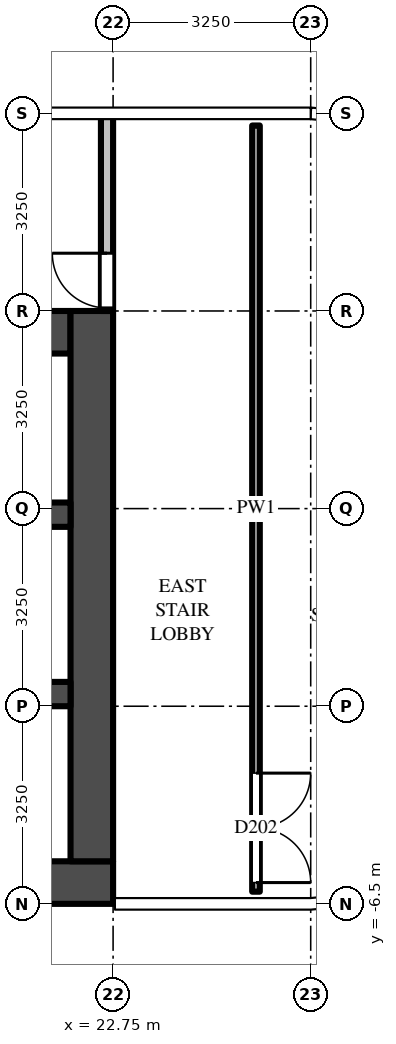
"""IFC4 building model, lengths in metres.
Left out: names, types, materials, properties, quantities, classifications, styles, units other than length and angle.
Written with IfcOpenShell. Run it as: python <this file> out.ifc"""

import sys

from ifc_helpers import new_model, si_unit, direction, frame, frame_2d, origin, place, context, subcontext, project, spatial, rectangle, extrude, source, transform, mapped, element, fill, save


model = new_model("IFC4")
c1 = context("Model", 3, precision=1e-05, world=origin(), true_north=direction((0.0, 1.0)))
c2 = subcontext(c1, "Body", "Model", "MODEL_VIEW")
j1 = project(units=[si_unit("LENGTHUNIT", "METRE"), si_unit("PLANEANGLEUNIT", "RADIAN")], contexts=[c1])
p1 = place(None, origin())
s1 = spatial("IfcSite", under=j1, at=p1, CompositionType="ELEMENT")
p2 = place(p1, origin())
s2 = spatial("IfcBuilding", under=s1, at=p2, CompositionType="ELEMENT")
p3 = place(p2, frame((0.0, 0.0, 124.5)))
s3 = spatial("IfcBuildingStorey", under=s2, at=p3, CompositionType="ELEMENT", Elevation=124.5)
m1 = source(origin(), c2, "Body", "SweptSolid", [
    extrude(rectangle(XDim=16.5, YDim=0.7, at=frame_2d((8.25, 0.0))), origin(), (0.0, 0.0, 1.0), 4.25),
])
p4 = place(p3, frame((6.25, -6.15, 0.0), z_axis=(0.0, 0.0, 1.0), x_axis=(1.0, 0.0, 0.0)))
e1 = element("IfcWall", 1, at=p4, inside=s3, PredefinedType="SHEAR", context=c2, shape_type="MappedRepresentation", body=[
    mapped(m1, transform((0.0, 0.0, 0.0))),
])
m2 = source(origin(), c2, "Body", "SweptSolid", [
    extrude(rectangle(XDim=14.85, YDim=0.7, at=frame_2d((7.425, 0.0))), origin(), (0.0, 0.0, 1.0), 4.25),
])
p5 = place(p3, frame((7.2, 2.9, 0.0), z_axis=(0.0, 0.0, 1.0), x_axis=(1.0, 0.0, 0.0)))
e2 = element("IfcWall", 2, at=p5, inside=s3, PredefinedType="SHEAR", context=c2, shape_type="MappedRepresentation", body=[
    mapped(m2, transform((0.0, 0.0, 0.0))),
])
m3 = source(origin(), c2, "Body", "SweptSolid", [
    extrude(rectangle(XDim=1.3, YDim=2.1, at=frame_2d((0.65, 1.05))), frame((0.0, 0.36, 0.0), z_axis=(0.0, -1.0, 0.0), x_axis=(1.0, 0.0, 0.0)), (0.0, 0.0, 1.0), 0.72),
])
p6 = place(p5, frame((12.2, 0.0, 0.0)))
e3 = element("IfcOpeningElement", 3, at=p6, cuts=e2, PredefinedType="OPENING", context=c2, shape_type="MappedRepresentation", body=[
    mapped(m3, transform((0.0, 0.0, 0.0))),
])
m4 = source(origin(), c2, "Body", "SweptSolid", [
    extrude(rectangle(XDim=1.2, YDim=2.1, at=frame_2d((0.6, 1.05))), frame((0.0, 0.36, 0.0), z_axis=(0.0, -1.0, 0.0), x_axis=(1.0, 0.0, 0.0)), (0.0, 0.0, 1.0), 0.72),
])
p7 = place(p5, frame((9.85, 0.0, 0.0)))
e4 = element("IfcOpeningElement", 4, at=p7, cuts=e2, PredefinedType="OPENING", context=c2, shape_type="MappedRepresentation", body=[
    mapped(m4, transform((0.0, 0.0, 0.0))),
])
m5 = source(origin(), c2, "Body", "SweptSolid", [
    extrude(rectangle(XDim=1.0, YDim=2.1, at=frame_2d((0.5, 1.05))), frame((0.0, 0.36, 0.0), z_axis=(0.0, -1.0, 0.0), x_axis=(1.0, 0.0, 0.0)), (0.0, 0.0, 1.0), 0.72),
])
p8 = place(p5, frame((7.9, 0.0, 0.0)))
e5 = element("IfcOpeningElement", 5, at=p8, cuts=e2, PredefinedType="OPENING", context=c2, shape_type="MappedRepresentation", body=[
    mapped(m5, transform((0.0, 0.0, 0.0))),
])
m6 = source(origin(), c2, "Body", "SweptSolid", [
    extrude(rectangle(XDim=0.9, YDim=2.1, at=frame_2d((0.45, 1.05))), frame((0.0, 0.36, 0.0), z_axis=(0.0, -1.0, 0.0), x_axis=(1.0, 0.0, 0.0)), (0.0, 0.0, 1.0), 0.72),
])
p9 = place(p5, frame((0.65, 0.0, 0.0)))
e6 = element("IfcOpeningElement", 6, at=p9, cuts=e2, PredefinedType="OPENING", context=c2, shape_type="MappedRepresentation", body=[
    mapped(m6, transform((0.0, 0.0, 0.0))),
])
p10 = place(p5, frame((3.2, 0.0, 0.0)))
e7 = element("IfcOpeningElement", 7, at=p10, cuts=e2, PredefinedType="OPENING", context=c2, shape_type="MappedRepresentation", body=[
    mapped(m5, transform((0.0, 0.0, 0.0))),
])
p11 = place(p5, frame((5.85, 0.0, 0.0)))
e8 = element("IfcOpeningElement", 8, at=p11, cuts=e2, PredefinedType="OPENING", context=c2, shape_type="MappedRepresentation", body=[
    mapped(m6, transform((0.0, 0.0, 0.0))),
])
m7 = source(origin(), c2, "Body", "SweptSolid", [
    extrude(rectangle(XDim=9.05, YDim=0.7, at=frame_2d((4.525, 0.0))), origin(), (0.0, 0.0, 1.0), 4.25),
])
p12 = place(p3, frame((22.4, -5.8, 0.0), z_axis=(0.0, 0.0, 1.0), x_axis=(0.0, 1.0, 0.0)))
e9 = element("IfcWall", 9, at=p12, inside=s3, PredefinedType="SHEAR", context=c2, shape_type="MappedRepresentation", body=[
    mapped(m7, transform((0.0, 0.0, 0.0))),
])
m8 = source(origin(), c2, "Body", "SweptSolid", [
    extrude(rectangle(XDim=14.85, YDim=0.4, at=frame_2d((7.425, 0.0))), origin(), (0.0, 0.0, 1.0), 4.25),
])
p13 = place(p3, frame((7.2, -0.1, 0.0), z_axis=(0.0, 0.0, 1.0), x_axis=(1.0, 0.0, 0.0)))
e10 = element("IfcWall", 10, at=p13, inside=s3, PredefinedType="SHEAR", context=c2, shape_type="MappedRepresentation", body=[
    mapped(m8, transform((0.0, 0.0, 0.0))),
])
m9 = source(origin(), c2, "Body", "SweptSolid", [
    extrude(rectangle(XDim=1.0, YDim=2.1, at=frame_2d((0.5, 1.05))), frame((0.0, 0.21, 0.0), z_axis=(0.0, -1.0, 0.0), x_axis=(1.0, 0.0, 0.0)), (0.0, 0.0, 1.0), 0.42),
])
p14 = place(p13, frame((7.9, 0.0, 0.0)))
e11 = element("IfcOpeningElement", 11, at=p14, cuts=e10, PredefinedType="OPENING", context=c2, shape_type="MappedRepresentation", body=[
    mapped(m9, transform((0.0, 0.0, 0.0))),
])
m10 = source(origin(), c2, "Body", "SweptSolid", [
    extrude(rectangle(XDim=5.7, YDim=0.4, at=frame_2d((2.85, 0.0))), origin(), (0.0, 0.0, 1.0), 4.25),
])
p15 = place(p3, frame((16.35, -3.05, 0.0), z_axis=(0.0, 0.0, 1.0), x_axis=(1.0, 0.0, 0.0)))
e12 = element("IfcWall", 12, at=p15, inside=s3, PredefinedType="SHEAR", context=c2, shape_type="MappedRepresentation", body=[
    mapped(m10, transform((0.0, 0.0, 0.0))),
])
m11 = source(origin(), c2, "Body", "SweptSolid", [
    extrude(rectangle(XDim=3.25, YDim=0.2, at=frame_2d((1.625, 0.0))), origin(), (0.0, 0.0, 1.0), 4.25),
])
p16 = place(p3, frame((22.65, 3.25, 0.0), z_axis=(0.0, 0.0, 1.0), x_axis=(0.0, 1.0, 0.0)))
e13 = element("IfcWall", 13, at=p16, inside=s3, PredefinedType="PARTITIONING", context=c2, shape_type="MappedRepresentation", body=[
    mapped(m11, transform((0.0, 0.0, 0.0))),
])
m12 = source(origin(), c2, "Body", "SweptSolid", [
    extrude(rectangle(XDim=0.9, YDim=2.1, at=frame_2d((0.45, 1.05))), frame((0.0, 0.11, 0.0), z_axis=(0.0, -1.0, 0.0), x_axis=(1.0, 0.0, 0.0)), (0.0, 0.0, 1.0), 0.22),
])
p17 = place(p16, frame((0.05, 0.0, 0.0)))
e14 = element("IfcOpeningElement", 14, at=p17, cuts=e13, PredefinedType="OPENING", context=c2, shape_type="MappedRepresentation", body=[
    mapped(m12, transform((0.0, 0.0, 0.0))),
])
m13 = source(origin(), c2, "Body", "SweptSolid", [
    extrude(rectangle(XDim=12.6, YDim=0.125, at=frame_2d((6.3, 0.0))), origin(), (0.0, 0.0, 1.0), 3.33),
])
p18 = place(p3, frame((25.1, 6.3, 0.0), z_axis=(0.0, 0.0, 1.0), x_axis=(0.0, -1.0, 0.0)))
e15 = element("IfcWall", 15, at=p18, inside=s3, PredefinedType="PARTITIONING", context=c2, shape_type="MappedRepresentation", body=[
    mapped(m13, transform((0.0, 0.0, 0.0))),
])
m14 = source(origin(), c2, "Body", "SweptSolid", [
    extrude(rectangle(XDim=1.8, YDim=2.1, at=frame_2d((0.9, 1.05))), frame((0.0, 0.073, 0.0), z_axis=(0.0, -1.0, 0.0), x_axis=(1.0, 0.0, 0.0)), (0.0, 0.0, 1.0), 0.145),
])
p19 = place(p18, frame((10.65, 0.0, 0.0)))
e16 = element("IfcOpeningElement", 16, at=p19, cuts=e15, PredefinedType="OPENING", context=c2, shape_type="MappedRepresentation", body=[
    mapped(m14, transform((0.0, 0.0, 0.0))),
])
m15 = source(origin(), c2, "Body", "SweptSolid", [
    extrude(rectangle(XDim=0.9, YDim=2.1, at=frame_2d((0.45, 1.05))), frame((0.0, 0.025, 0.0), z_axis=(0.0, -1.0, 0.0), x_axis=(1.0, 0.0, 0.0)), (0.0, 0.0, 1.0), 0.05),
])
p20 = place(p17, origin())
e17 = element("IfcDoor", 17, at=p20, inside=s3, OperationType="SINGLE_SWING_RIGHT", PredefinedType="DOOR", context=c2, shape_type="MappedRepresentation", body=[
    mapped(m15, transform((0.0, 0.0, 0.0))),
])
fill(e14, e17)
m16 = source(origin(), c2, "Body", "SweptSolid", [
    extrude(rectangle(XDim=1.8, YDim=2.1, at=frame_2d((0.9, 1.05))), frame((0.0, 0.025, 0.0), z_axis=(0.0, -1.0, 0.0), x_axis=(1.0, 0.0, 0.0)), (0.0, 0.0, 1.0), 0.05),
])
p21 = place(p19, origin())
e18 = element("IfcDoor", 18, at=p21, inside=s3, OperationType="DOUBLE_DOOR_SINGLE_SWING", PredefinedType="DOOR", context=c2, shape_type="MappedRepresentation", body=[
    mapped(m16, transform((0.0, 0.0, 0.0))),
])
fill(e16, e18)
save(model, sys.argv[1])
